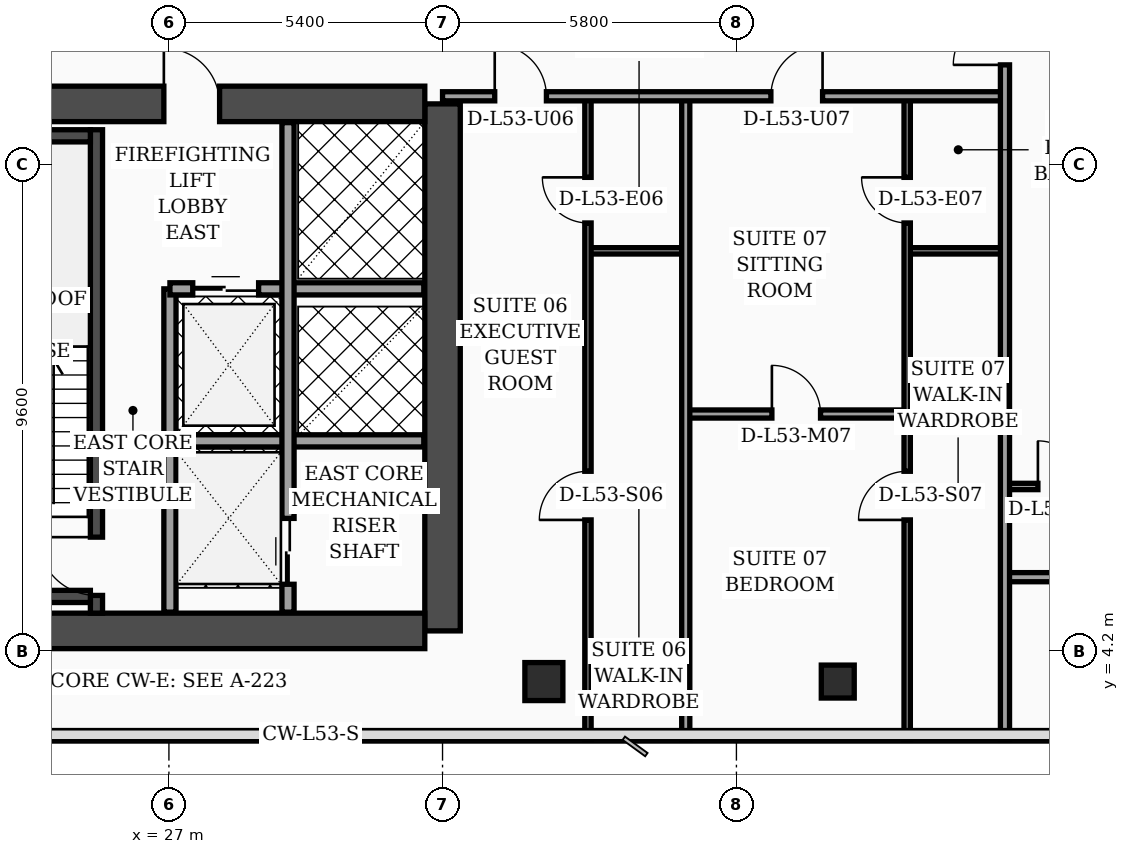
"""IFC4 building model, lengths in metres.
Left out: names, types, materials, properties, quantities, classifications, styles, units other than length and angle.
Written with IfcOpenShell. Run it as: python <this file> out.ifc"""

import sys

from ifc_helpers import new_model, si_unit, direction, frame, frame_2d, origin, origin_2d, place, context, subcontext, project, spatial, rectangle, hollow_rectangle, extrude, element, fill, save


model = new_model("IFC4")
c1 = context("Model", 3, precision=1e-05, world=origin(), true_north=direction((0.0, 1.0)))
c2 = subcontext(c1, "Body", "Model", "MODEL_VIEW")
j1 = project(units=[si_unit("LENGTHUNIT", "METRE"), si_unit("PLANEANGLEUNIT", "RADIAN")], contexts=[c1])
p1 = place(None, origin())
s1 = spatial("IfcSite", under=j1, at=p1, CompositionType="ELEMENT")
p2 = place(p1, origin())
s2 = spatial("IfcBuilding", under=s1, at=p2, CompositionType="ELEMENT")
p3 = place(p2, frame((0.0, 0.0, 214.8)))
s3 = spatial("IfcBuildingStorey", under=s2, at=p3, CompositionType="ELEMENT", Elevation=214.8)
p4 = place(p3, frame((32.4, 4.6, 0.0), z_axis=(0.0, 0.0, 1.0), x_axis=(0.0, 1.0, 0.0)))
e1 = element("IfcWall", 1, at=p4, inside=s3, PredefinedType="SHEAR", context=c2, shape_type="SweptSolid", body=[
    extrude(rectangle(XDim=10.4, YDim=0.7, at=frame_2d((5.2, 0.0))), origin(), (0.0, 0.0, 1.0), 4.05),
])
p5 = place(p3, frame((21.95, 15.0, 0.0), z_axis=(0.0, 0.0, 1.0), x_axis=(1.0, 0.0, 0.0)))
e2 = element("IfcWall", 2, at=p5, inside=s3, PredefinedType="SHEAR", context=c2, shape_type="SweptSolid", body=[
    extrude(rectangle(XDim=10.1, YDim=0.7, at=frame_2d((5.05, 0.0))), origin(), (0.0, 0.0, 1.0), 4.05),
])
p6 = place(p5, frame((4.95, 0.0, 0.0)))
e3 = element("IfcOpeningElement", 3, at=p6, cuts=e2, PredefinedType="OPENING", context=c2, shape_type="SweptSolid", body=[
    extrude(rectangle(XDim=1.1, YDim=2.2, at=frame_2d((0.55, 1.1))), frame((0.0, 0.36, 0.0), z_axis=(0.0, -1.0, 0.0), x_axis=(1.0, 0.0, 0.0)), (0.0, 0.0, 1.0), 0.72),
])
p7 = place(p3, frame((21.95, 4.6, 0.0), z_axis=(0.0, 0.0, 1.0), x_axis=(1.0, 0.0, 0.0)))
e4 = element("IfcWall", 4, at=p7, inside=s3, PredefinedType="SHEAR", context=c2, shape_type="SweptSolid", body=[
    extrude(rectangle(XDim=10.1, YDim=0.7, at=frame_2d((5.05, 0.0))), origin(), (0.0, 0.0, 1.0), 4.05),
])
p8 = place(p3, frame((25.57, 4.95, 0.0), z_axis=(0.0, 0.0, 1.0), x_axis=(0.0, 1.0, 0.0)))
e5 = element("IfcWall", 5, at=p8, inside=s3, PredefinedType="SOLIDWALL", context=c2, shape_type="SweptSolid", body=[
    extrude(rectangle(XDim=9.54, YDim=0.24, at=frame_2d((4.77, 0.0))), origin(), (0.0, 0.0, 1.0), 4.05),
])
p9 = place(p8, frame((0.35, 0.0, 0.0)))
e6 = element("IfcOpeningElement", 6, at=p9, cuts=e5, PredefinedType="OPENING", context=c2, shape_type="SweptSolid", body=[
    extrude(rectangle(XDim=1.15, YDim=2.2, at=frame_2d((0.575, 1.1))), frame((0.0, 0.13, 0.0), z_axis=(0.0, -1.0, 0.0), x_axis=(1.0, 0.0, 0.0)), (0.0, 0.0, 1.0), 0.26),
])
for number, where, z_axis, x_axis in (
    (7, (22.35, 5.28, 0.0), (0.0, 0.0, 1.0), (1.0, 0.0, 0.0)),
    (8, (22.35, 14.37, 0.0), (0.0, 0.0, 1.0), (1.0, 0.0, 0.0)),
):
    element("IfcWall", number, at=place(p3, frame(where, z_axis=z_axis, x_axis=x_axis)), inside=s3, PredefinedType="SOLIDWALL", context=c2, shape_type="SweptSolid", body=[
        extrude(rectangle(XDim=3.1, YDim=0.24, at=frame_2d((1.55, 0.0))), origin(), (0.0, 0.0, 1.0), 4.05),
    ])
p10 = place(p3, frame((34.4, 3.6, 0.0), z_axis=(0.0, 0.0, 1.0), x_axis=(1.0, 0.0, 0.0)))
e9 = element("IfcColumn", 9, at=p10, inside=s3, PredefinedType="COLUMN", context=c2, shape_type="SweptSolid", body=[
    extrude(hollow_rectangle(XDim=0.75, YDim=0.75, WallThickness=0.032, at=origin_2d()), origin(), (0.0, 0.0, 1.0), 4.05),
])
p11 = place(p3, frame((40.2, 3.6, 0.0), z_axis=(0.0, 0.0, 1.0), x_axis=(1.0, 0.0, 0.0)))
e10 = element("IfcColumn", 10, at=p11, inside=s3, PredefinedType="COLUMN", context=c2, shape_type="SweptSolid", body=[
    extrude(hollow_rectangle(XDim=0.65, YDim=0.65, WallThickness=0.028, at=origin_2d()), origin(), (0.0, 0.0, 1.0), 4.05),
])
p12 = place(p3, frame((52.23, 5.505, 0.0), z_axis=(0.0, 0.0, 1.0), x_axis=(-0.300509063924, 0.953778958931, 0.0)))
e11 = element("IfcWall", 11, at=p12, inside=s3, PredefinedType="SOLIDWALL", context=c2, shape_type="SweptSolid", body=[
    extrude(rectangle(XDim=30.814, YDim=0.32, at=frame_2d((15.407, 0.0))), origin(), (0.0, 0.0, 1.0), 4.05),
])
p13 = place(p12, frame((4.747, 0.0, 0.0)))
e12 = element("IfcOpeningElement", 12, at=p13, cuts=e11, PredefinedType="OPENING", context=c2, shape_type="SweptSolid", body=[
    extrude(rectangle(XDim=1.4, YDim=2.25, at=frame_2d((0.7, 1.125))), frame((0.0, 0.17, 0.0), z_axis=(0.0, -1.0, 0.0), x_axis=(1.0, 0.0, 0.0)), (0.0, 0.0, 1.0), 0.34),
])
p14 = place(p12, frame((9.889, 0.0, 0.7)))
e13 = element("IfcOpeningElement", 13, at=p14, cuts=e11, PredefinedType="OPENING", context=c2, shape_type="SweptSolid", body=[
    extrude(rectangle(XDim=1.6, YDim=1.65, at=frame_2d((0.8, 0.825))), frame((0.0, 0.17, 0.0), z_axis=(0.0, -1.0, 0.0), x_axis=(1.0, 0.0, 0.0)), (0.0, 0.0, 1.0), 0.34),
])
p15 = place(p12, frame((18.696, 0.0, 0.7)))
e14 = element("IfcOpeningElement", 14, at=p15, cuts=e11, PredefinedType="OPENING", context=c2, shape_type="SweptSolid", body=[
    extrude(rectangle(XDim=1.6, YDim=1.65, at=frame_2d((0.8, 0.825))), frame((0.0, 0.17, 0.0), z_axis=(0.0, -1.0, 0.0), x_axis=(1.0, 0.0, 0.0)), (0.0, 0.0, 1.0), 0.34),
])
p16 = place(p12, frame((2.65, 0.0, 0.75)))
e15 = element("IfcOpeningElement", 15, at=p16, cuts=e11, PredefinedType="OPENING", context=c2, shape_type="SweptSolid", body=[
    extrude(rectangle(XDim=1.5, YDim=1.6, at=frame_2d((0.75, 0.8))), frame((0.0, 0.17, 0.0), z_axis=(0.0, -1.0, 0.0), x_axis=(1.0, 0.0, 0.0)), (0.0, 0.0, 1.0), 0.34),
])
p17 = place(p12, frame((7.8, 0.0, 0.75)))
e16 = element("IfcOpeningElement", 16, at=p17, cuts=e11, PredefinedType="OPENING", context=c2, shape_type="SweptSolid", body=[
    extrude(rectangle(XDim=1.5, YDim=1.6, at=frame_2d((0.75, 0.8))), frame((0.0, 0.17, 0.0), z_axis=(0.0, -1.0, 0.0), x_axis=(1.0, 0.0, 0.0)), (0.0, 0.0, 1.0), 0.34),
])
p18 = place(p12, frame((14.0, 0.0, 0.75)))
e17 = element("IfcOpeningElement", 17, at=p18, cuts=e11, PredefinedType="OPENING", context=c2, shape_type="SweptSolid", body=[
    extrude(rectangle(XDim=1.5, YDim=1.6, at=frame_2d((0.75, 0.8))), frame((0.0, 0.17, 0.0), z_axis=(0.0, -1.0, 0.0), x_axis=(1.0, 0.0, 0.0)), (0.0, 0.0, 1.0), 0.34),
])
p19 = place(p12, frame((16.55, 0.0, 0.75)))
e18 = element("IfcOpeningElement", 18, at=p19, cuts=e11, PredefinedType="OPENING", context=c2, shape_type="SweptSolid", body=[
    extrude(rectangle(XDim=1.5, YDim=1.6, at=frame_2d((0.75, 0.8))), frame((0.0, 0.17, 0.0), z_axis=(0.0, -1.0, 0.0), x_axis=(1.0, 0.0, 0.0)), (0.0, 0.0, 1.0), 0.34),
])
p20 = place(p12, frame((20.75, 0.0, 0.75)))
e19 = element("IfcOpeningElement", 19, at=p20, cuts=e11, PredefinedType="OPENING", context=c2, shape_type="SweptSolid", body=[
    extrude(rectangle(XDim=1.5, YDim=1.6, at=frame_2d((0.75, 0.8))), frame((0.0, 0.17, 0.0), z_axis=(0.0, -1.0, 0.0), x_axis=(1.0, 0.0, 0.0)), (0.0, 0.0, 1.0), 0.34),
])
p21 = place(p12, frame((23.3, 0.0, 0.75)))
e20 = element("IfcOpeningElement", 20, at=p21, cuts=e11, PredefinedType="OPENING", context=c2, shape_type="SweptSolid", body=[
    extrude(rectangle(XDim=1.5, YDim=1.6, at=frame_2d((0.75, 0.8))), frame((0.0, 0.17, 0.0), z_axis=(0.0, -1.0, 0.0), x_axis=(1.0, 0.0, 0.0)), (0.0, 0.0, 1.0), 0.34),
])
p22 = place(p12, frame((26.4, 0.0, 0.75)))
e21 = element("IfcOpeningElement", 21, at=p22, cuts=e11, PredefinedType="OPENING", context=c2, shape_type="SweptSolid", body=[
    extrude(rectangle(XDim=1.5, YDim=1.6, at=frame_2d((0.75, 0.8))), frame((0.0, 0.17, 0.0), z_axis=(0.0, -1.0, 0.0), x_axis=(1.0, 0.0, 0.0)), (0.0, 0.0, 1.0), 0.34),
])
p23 = place(p3, frame((27.02, 4.97, 0.0), z_axis=(0.0, 0.0, 1.0), x_axis=(0.0, 1.0, 0.0)))
e22 = element("IfcWall", 22, at=p23, inside=s3, PredefinedType="SOLIDWALL", context=c2, shape_type="SweptSolid", body=[
    extrude(rectangle(XDim=6.38, YDim=0.24, at=frame_2d((3.19, 0.0))), origin(), (0.0, 0.0, 1.0), 4.05),
])
p24 = place(p3, frame((27.02, 11.35, 0.0), z_axis=(0.0, 0.0, 1.0), x_axis=(1.0, 0.0, 0.0)))
e23 = element("IfcWall", 23, at=p24, inside=s3, PredefinedType="SOLIDWALL", context=c2, shape_type="SweptSolid", body=[
    extrude(rectangle(XDim=5.01, YDim=0.24, at=frame_2d((2.505, 0.0))), origin(), (0.0, 0.0, 1.0), 4.05),
])
p25 = place(p24, frame((0.45, 0.0, 0.0)))
e24 = element("IfcOpeningElement", 24, at=p25, cuts=e23, PredefinedType="OPENING", context=c2, shape_type="SweptSolid", body=[
    extrude(rectangle(XDim=1.3, YDim=2.35, at=frame_2d((0.65, 1.175))), frame((0.0, 0.13, 0.0), z_axis=(0.0, -1.0, 0.0), x_axis=(1.0, 0.0, 0.0)), (0.0, 0.0, 1.0), 0.26),
])
p26 = place(p3, frame((27.02, 8.35, 0.0), z_axis=(0.0, 0.0, 1.0), x_axis=(1.0, 0.0, 0.0)))
e25 = element("IfcWall", 25, at=p26, inside=s3, PredefinedType="SOLIDWALL", context=c2, shape_type="SweptSolid", body=[
    extrude(rectangle(XDim=5.01, YDim=0.24, at=frame_2d((2.505, 0.0))), origin(), (0.0, 0.0, 1.0), 4.05),
])
p27 = place(p3, frame((29.35, 4.97, 0.0), z_axis=(0.0, 0.0, 1.0), x_axis=(0.0, 1.0, 0.0)))
e26 = element("IfcWall", 26, at=p27, inside=s3, PredefinedType="SOLIDWALL", context=c2, shape_type="SweptSolid", body=[
    extrude(rectangle(XDim=9.66, YDim=0.24, at=frame_2d((4.83, 0.0))), origin(), (0.0, 0.0, 1.0), 4.05),
])
p28 = place(p27, frame((0.55, 0.0, 0.0)))
e27 = element("IfcOpeningElement", 27, at=p28, cuts=e26, PredefinedType="OPENING", context=c2, shape_type="SweptSolid", body=[
    extrude(rectangle(XDim=1.3, YDim=2.35, at=frame_2d((0.65, 1.175))), frame((0.0, 0.13, 0.0), z_axis=(0.0, -1.0, 0.0), x_axis=(1.0, 0.0, 0.0)), (0.0, 0.0, 1.0), 0.26),
])
p29 = place(p3, frame((35.27, 12.1, 0.0), z_axis=(0.0, 0.0, 1.0), x_axis=(1.0, 0.0, 0.0)))
e28 = element("IfcWall", 28, at=p29, inside=s3, PredefinedType="PARTITIONING", context=c2, shape_type="SweptSolid", body=[
    extrude(rectangle(XDim=1.93, YDim=0.125, at=frame_2d((0.965, 0.0))), origin(), (0.0, 0.0, 1.0), 4.05),
])
p30 = place(p3, frame((35.27, 2.44, 0.0), z_axis=(0.0, 0.0, 1.0), x_axis=(0.0, 1.0, 0.0)))
e29 = element("IfcWall", 29, at=p30, inside=s3, PredefinedType="PARTITIONING", context=c2, shape_type="SweptSolid", body=[
    extrude(rectangle(XDim=12.71, YDim=0.125, at=frame_2d((6.355, 0.0))), origin(), (0.0, 0.0, 1.0), 2.35),
])
p31 = place(p30, frame((4.35, 0.0, 0.0)))
e30 = element("IfcOpeningElement", 30, at=p31, cuts=e29, PredefinedType="OPENING", context=c2, shape_type="SweptSolid", body=[
    extrude(rectangle(XDim=0.96, YDim=2.2, at=frame_2d((0.48, 1.1))), frame((0.0, 0.073, 0.0), z_axis=(0.0, -1.0, 0.0), x_axis=(1.0, 0.0, 0.0)), (0.0, 0.0, 1.0), 0.145),
])
p32 = place(p30, frame((10.21, 0.0, 0.0)))
e31 = element("IfcOpeningElement", 31, at=p32, cuts=e29, PredefinedType="OPENING", context=c2, shape_type="SweptSolid", body=[
    extrude(rectangle(XDim=0.9, YDim=2.15, at=frame_2d((0.45, 1.075))), frame((0.0, 0.073, 0.0), z_axis=(0.0, -1.0, 0.0), x_axis=(1.0, 0.0, 0.0)), (0.0, 0.0, 1.0), 0.145),
])
p33 = place(p3, frame((41.57, 12.1, 0.0), z_axis=(0.0, 0.0, 1.0), x_axis=(1.0, 0.0, 0.0)))
e32 = element("IfcWall", 32, at=p33, inside=s3, PredefinedType="PARTITIONING", context=c2, shape_type="SweptSolid", body=[
    extrude(rectangle(XDim=1.93, YDim=0.125, at=frame_2d((0.965, 0.0))), origin(), (0.0, 0.0, 1.0), 4.05),
])
p34 = place(p3, frame((37.2, 8.88, 0.0), z_axis=(0.0, 0.0, 1.0), x_axis=(1.0, 0.0, 0.0)))
e33 = element("IfcWall", 33, at=p34, inside=s3, PredefinedType="PARTITIONING", context=c2, shape_type="SweptSolid", body=[
    extrude(rectangle(XDim=4.37, YDim=0.16, at=frame_2d((2.185, 0.0))), origin(), (0.0, 0.0, 1.0), 3.45),
])
p35 = place(p34, frame((1.7, 0.0, 0.0)))
e34 = element("IfcOpeningElement", 34, at=p35, cuts=e33, PredefinedType="OPENING", context=c2, shape_type="SweptSolid", body=[
    extrude(rectangle(XDim=0.96, YDim=2.2, at=frame_2d((0.48, 1.1))), frame((0.0, 0.09, 0.0), z_axis=(0.0, -1.0, 0.0), x_axis=(1.0, 0.0, 0.0)), (0.0, 0.0, 1.0), 0.18),
])
p36 = place(p3, frame((41.57, 2.44, 0.0), z_axis=(0.0, 0.0, 1.0), x_axis=(0.0, 1.0, 0.0)))
e35 = element("IfcWall", 35, at=p36, inside=s3, PredefinedType="PARTITIONING", context=c2, shape_type="SweptSolid", body=[
    extrude(rectangle(XDim=12.71, YDim=0.125, at=frame_2d((6.355, 0.0))), origin(), (0.0, 0.0, 1.0), 2.35),
])
p37 = place(p36, frame((4.35, 0.0, 0.0)))
e36 = element("IfcOpeningElement", 36, at=p37, cuts=e35, PredefinedType="OPENING", context=c2, shape_type="SweptSolid", body=[
    extrude(rectangle(XDim=0.96, YDim=2.2, at=frame_2d((0.48, 1.1))), frame((0.0, 0.073, 0.0), z_axis=(0.0, -1.0, 0.0), x_axis=(1.0, 0.0, 0.0)), (0.0, 0.0, 1.0), 0.145),
])
p38 = place(p36, frame((10.21, 0.0, 0.0)))
e37 = element("IfcOpeningElement", 37, at=p38, cuts=e35, PredefinedType="OPENING", context=c2, shape_type="SweptSolid", body=[
    extrude(rectangle(XDim=0.9, YDim=2.15, at=frame_2d((0.45, 1.075))), frame((0.0, 0.073, 0.0), z_axis=(0.0, -1.0, 0.0), x_axis=(1.0, 0.0, 0.0)), (0.0, 0.0, 1.0), 0.145),
])
p39 = place(p3, frame((37.2, 2.44, 0.0), z_axis=(0.0, 0.0, 1.0), x_axis=(0.0, 1.0, 0.0)))
e38 = element("IfcWall", 38, at=p39, inside=s3, PredefinedType="PARTITIONING", context=c2, shape_type="SweptSolid", body=[
    extrude(rectangle(XDim=12.71, YDim=0.16, at=frame_2d((6.355, 0.0))), origin(), (0.0, 0.0, 1.0), 2.35),
])
p40 = place(p3, frame((32.4, 15.15, 0.0), z_axis=(0.0, 0.0, 1.0), x_axis=(1.0, 0.0, 0.0)))
e39 = element("IfcWall", 39, at=p40, inside=s3, PredefinedType="PARTITIONING", context=c2, shape_type="SweptSolid", body=[
    extrude(rectangle(XDim=11.1, YDim=0.18, at=frame_2d((5.55, 0.0))), origin(), (0.0, 0.0, 1.0), 2.35),
])
p41 = place(p40, frame((1.03, 0.0, 0.0)))
e40 = element("IfcOpeningElement", 40, at=p41, cuts=e39, PredefinedType="OPENING", context=c2, shape_type="SweptSolid", body=[
    extrude(rectangle(XDim=1.02, YDim=2.2, at=frame_2d((0.51, 1.1))), frame((0.0, 0.1, 0.0), z_axis=(0.0, -1.0, 0.0), x_axis=(1.0, 0.0, 0.0)), (0.0, 0.0, 1.0), 0.2),
])
p42 = place(p40, frame((6.48, 0.0, 0.0)))
e41 = element("IfcOpeningElement", 41, at=p42, cuts=e39, PredefinedType="OPENING", context=c2, shape_type="SweptSolid", body=[
    extrude(rectangle(XDim=1.02, YDim=2.2, at=frame_2d((0.51, 1.1))), frame((0.0, 0.1, 0.0), z_axis=(0.0, -1.0, 0.0), x_axis=(1.0, 0.0, 0.0)), (0.0, 0.0, 1.0), 0.2),
])
p43 = place(p3, frame((43.5, 7.45, 0.0), z_axis=(0.0, 0.0, 1.0), x_axis=(1.0, 0.0, 0.0)))
e42 = element("IfcWall", 42, at=p43, inside=s3, PredefinedType="PARTITIONING", context=c2, shape_type="SweptSolid", body=[
    extrude(rectangle(XDim=8.06, YDim=0.125, at=frame_2d((4.03, 0.0))), origin(), (0.0, 0.0, 1.0), 2.35),
])
p44 = place(p43, frame((0.65, 0.0, 0.0)))
e43 = element("IfcOpeningElement", 43, at=p44, cuts=e42, PredefinedType="OPENING", context=c2, shape_type="SweptSolid", body=[
    extrude(rectangle(XDim=0.9, YDim=2.15, at=frame_2d((0.45, 1.075))), frame((0.0, 0.073, 0.0), z_axis=(0.0, -1.0, 0.0), x_axis=(1.0, 0.0, 0.0)), (0.0, 0.0, 1.0), 0.145),
])
p45 = place(p3, frame((43.5, 5.66, 0.0), z_axis=(0.0, 0.0, 1.0), x_axis=(1.0, 0.0, 0.0)))
e44 = element("IfcWall", 44, at=p45, inside=s3, PredefinedType="PARTITIONING", context=c2, shape_type="SweptSolid", body=[
    extrude(rectangle(XDim=5.5, YDim=0.18, at=frame_2d((2.75, 0.0))), origin(), (0.0, 0.0, 1.0), 2.35),
])
p46 = place(p3, frame((43.5, 2.44, 0.0), z_axis=(0.0, 0.0, 1.0), x_axis=(0.0, 1.0, 0.0)))
e45 = element("IfcWall", 45, at=p46, inside=s3, PredefinedType="PARTITIONING", context=c2, shape_type="SweptSolid", body=[
    extrude(rectangle(XDim=15.41, YDim=0.18, at=frame_2d((7.705, 0.0))), origin(), (0.0, 0.0, 1.0), 2.35),
])
p47 = place(p46, frame((13.33, 0.0, 0.0)))
e46 = element("IfcOpeningElement", 46, at=p47, cuts=e45, PredefinedType="OPENING", context=c2, shape_type="SweptSolid", body=[
    extrude(rectangle(XDim=1.02, YDim=2.2, at=frame_2d((0.51, 1.1))), frame((0.0, 0.1, 0.0), z_axis=(0.0, -1.0, 0.0), x_axis=(1.0, 0.0, 0.0)), (0.0, 0.0, 1.0), 0.2),
])
p48 = place(p25, origin())
e47 = element("IfcDoor", 47, at=p48, inside=s3, OperationType="DOUBLE_DOOR_SLIDING", PredefinedType="DOOR", context=c2, shape_type="SweptSolid", body=[
    extrude(rectangle(XDim=1.3, YDim=2.35, at=frame_2d((0.65, 1.175))), frame((0.0, 0.025, 0.0), z_axis=(0.0, -1.0, 0.0), x_axis=(1.0, 0.0, 0.0)), (0.0, 0.0, 1.0), 0.05),
])
fill(e24, e47)
p49 = place(p28, origin())
e48 = element("IfcDoor", 48, at=p49, inside=s3, OperationType="DOUBLE_DOOR_SLIDING", PredefinedType="DOOR", context=c2, shape_type="SweptSolid", body=[
    extrude(rectangle(XDim=1.3, YDim=2.35, at=frame_2d((0.65, 1.175))), frame((0.0, 0.025, 0.0), z_axis=(0.0, -1.0, 0.0), x_axis=(1.0, 0.0, 0.0)), (0.0, 0.0, 1.0), 0.05),
])
fill(e27, e48)
p50 = place(p31, origin())
e49 = element("IfcDoor", 49, at=p50, inside=s3, OperationType="SINGLE_SWING_LEFT", PredefinedType="DOOR", context=c2, shape_type="SweptSolid", body=[
    extrude(rectangle(XDim=0.96, YDim=2.2, at=frame_2d((0.48, 1.1))), frame((0.0, 0.025, 0.0), z_axis=(0.0, -1.0, 0.0), x_axis=(1.0, 0.0, 0.0)), (0.0, 0.0, 1.0), 0.05),
])
fill(e30, e49)
p51 = place(p32, origin())
e50 = element("IfcDoor", 50, at=p51, inside=s3, OperationType="SINGLE_SWING_RIGHT", PredefinedType="DOOR", context=c2, shape_type="SweptSolid", body=[
    extrude(rectangle(XDim=0.9, YDim=2.15, at=frame_2d((0.45, 1.075))), frame((0.0, 0.025, 0.0), z_axis=(0.0, -1.0, 0.0), x_axis=(1.0, 0.0, 0.0)), (0.0, 0.0, 1.0), 0.05),
])
fill(e31, e50)
p52 = place(p35, origin())
e51 = element("IfcDoor", 51, at=p52, inside=s3, OperationType="SINGLE_SWING_LEFT", PredefinedType="DOOR", context=c2, shape_type="SweptSolid", body=[
    extrude(rectangle(XDim=0.96, YDim=2.2, at=frame_2d((0.48, 1.1))), frame((0.0, 0.025, 0.0), z_axis=(0.0, -1.0, 0.0), x_axis=(1.0, 0.0, 0.0)), (0.0, 0.0, 1.0), 0.05),
])
fill(e34, e51)
p53 = place(p37, origin())
e52 = element("IfcDoor", 52, at=p53, inside=s3, OperationType="SINGLE_SWING_LEFT", PredefinedType="DOOR", context=c2, shape_type="SweptSolid", body=[
    extrude(rectangle(XDim=0.96, YDim=2.2, at=frame_2d((0.48, 1.1))), frame((0.0, 0.025, 0.0), z_axis=(0.0, -1.0, 0.0), x_axis=(1.0, 0.0, 0.0)), (0.0, 0.0, 1.0), 0.05),
])
fill(e36, e52)
p54 = place(p38, origin())
e53 = element("IfcDoor", 53, at=p54, inside=s3, OperationType="SINGLE_SWING_RIGHT", PredefinedType="DOOR", context=c2, shape_type="SweptSolid", body=[
    extrude(rectangle(XDim=0.9, YDim=2.15, at=frame_2d((0.45, 1.075))), frame((0.0, 0.025, 0.0), z_axis=(0.0, -1.0, 0.0), x_axis=(1.0, 0.0, 0.0)), (0.0, 0.0, 1.0), 0.05),
])
fill(e37, e53)
p55 = place(p41, origin())
e54 = element("IfcDoor", 54, at=p55, inside=s3, OperationType="SINGLE_SWING_LEFT", PredefinedType="DOOR", context=c2, shape_type="SweptSolid", body=[
    extrude(rectangle(XDim=1.02, YDim=2.2, at=frame_2d((0.51, 1.1))), frame((0.0, 0.025, 0.0), z_axis=(0.0, -1.0, 0.0), x_axis=(1.0, 0.0, 0.0)), (0.0, 0.0, 1.0), 0.05),
])
fill(e40, e54)
p56 = place(p42, origin())
e55 = element("IfcDoor", 55, at=p56, inside=s3, OperationType="SINGLE_SWING_RIGHT", PredefinedType="DOOR", context=c2, shape_type="SweptSolid", body=[
    extrude(rectangle(XDim=1.02, YDim=2.2, at=frame_2d((0.51, 1.1))), frame((0.0, 0.025, 0.0), z_axis=(0.0, -1.0, 0.0), x_axis=(1.0, 0.0, 0.0)), (0.0, 0.0, 1.0), 0.05),
])
fill(e41, e55)
p57 = place(p44, origin())
e56 = element("IfcDoor", 56, at=p57, inside=s3, OperationType="SINGLE_SWING_LEFT", PredefinedType="DOOR", context=c2, shape_type="SweptSolid", body=[
    extrude(rectangle(XDim=0.9, YDim=2.15, at=frame_2d((0.45, 1.075))), frame((0.0, 0.025, 0.0), z_axis=(0.0, -1.0, 0.0), x_axis=(1.0, 0.0, 0.0)), (0.0, 0.0, 1.0), 0.05),
])
fill(e43, e56)
p58 = place(p47, origin())
e57 = element("IfcDoor", 57, at=p58, inside=s3, OperationType="SINGLE_SWING_LEFT", PredefinedType="DOOR", context=c2, shape_type="SweptSolid", body=[
    extrude(rectangle(XDim=1.02, YDim=2.2, at=frame_2d((0.51, 1.1))), frame((0.0, 0.025, 0.0), z_axis=(0.0, -1.0, 0.0), x_axis=(1.0, 0.0, 0.0)), (0.0, 0.0, 1.0), 0.05),
])
fill(e46, e57)
p59 = place(p9, origin())
e58 = element("IfcDoor", 58, at=p59, inside=s3, OperationType="SINGLE_SWING_RIGHT", PredefinedType="DOOR", context=c2, shape_type="SweptSolid", body=[
    extrude(rectangle(XDim=1.15, YDim=2.2, at=frame_2d((0.575, 1.1))), frame((0.0, 0.025, 0.0), z_axis=(0.0, -1.0, 0.0), x_axis=(1.0, 0.0, 0.0)), (0.0, 0.0, 1.0), 0.05),
])
fill(e6, e58)
p60 = place(p6, origin())
e59 = element("IfcDoor", 59, at=p60, inside=s3, OperationType="SINGLE_SWING_LEFT", PredefinedType="DOOR", context=c2, shape_type="SweptSolid", body=[
    extrude(rectangle(XDim=1.1, YDim=2.2, at=frame_2d((0.55, 1.1))), frame((0.0, 0.025, 0.0), z_axis=(0.0, -1.0, 0.0), x_axis=(1.0, 0.0, 0.0)), (0.0, 0.0, 1.0), 0.05),
])
fill(e3, e59)
save(model, sys.argv[1])
